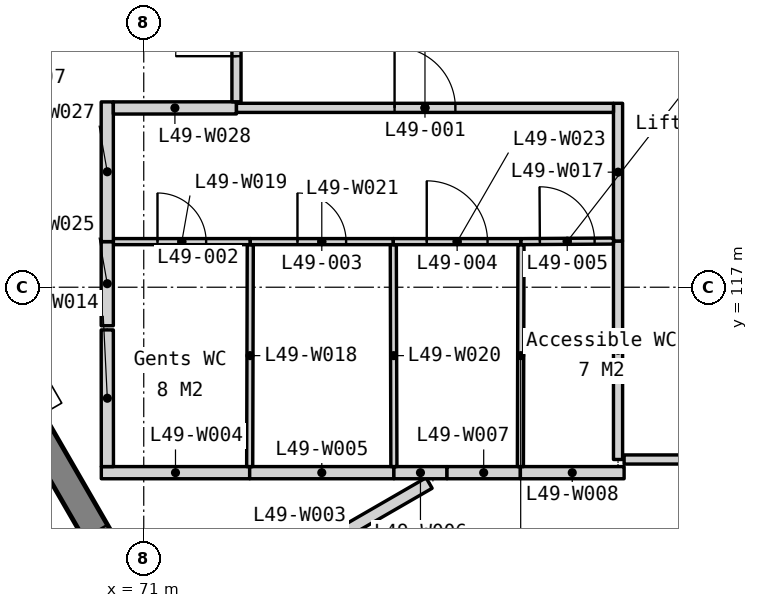
"""IFC4 building model, lengths in metres.
Left out: names, types, materials, properties, quantities, classifications, styles, units other than length and angle.
Written with IfcOpenShell. Run it as: python <this file> out.ifc"""

import sys

from ifc_helpers import new_model, si_unit, direction, frame, frame_2d, origin, place, context, subcontext, project, spatial, polyline, rectangle, outline, extrude, element, fill, save


model = new_model("IFC4")
c1 = context("Model", 3, precision=1e-05, world=origin(), true_north=direction((0.0, 1.0)))
c2 = subcontext(c1, "Body", "Model", "MODEL_VIEW")
j1 = project(units=[si_unit("LENGTHUNIT", "METRE"), si_unit("PLANEANGLEUNIT", "RADIAN")], contexts=[c1])
p1 = place(None, origin())
s1 = spatial("IfcSite", under=j1, at=p1, CompositionType="ELEMENT")
p2 = place(p1, origin())
s2 = spatial("IfcBuilding", under=s1, at=p2, CompositionType="ELEMENT")
p3 = place(p2, frame((0.0, 0.0, 195.8)))
s3 = spatial("IfcBuildingStorey", under=s2, at=p3, CompositionType="ELEMENT", Elevation=195.8)
p4 = place(p3, frame((59.13, 132.168, -0.15), z_axis=(0.0, 0.0, 1.0), x_axis=(0.500002199942, -0.866024133644, 0.0)))
e1 = element("IfcWall", 1, at=p4, inside=s3, PredefinedType="SOLIDWALL", context=c2, shape_type="SweptSolid", body=[
    extrude(outline(polyline([(38.729, 0.0), (38.729, 3.9), (0.0, 3.9), (0.0, 0.0), (38.729, 0.0)])), frame((0.0, 0.225, 0.0), z_axis=(0.0, -1.0, 0.0), x_axis=(1.0, 0.0, 0.0)), (0.0, 0.0, 1.0), 0.45),
])
p5 = place(p4, frame((2.791, 0.0, 0.95)))
e2 = element("IfcOpeningElement", 2, at=p5, cuts=e1, PredefinedType="OPENING", context=c2, shape_type="SweptSolid", body=[
    extrude(rectangle(XDim=1.8, YDim=2.2, at=frame_2d((0.9, 1.1))), frame((0.0, 0.235, 0.0), z_axis=(0.0, -1.0, 0.0), x_axis=(1.0, 0.0, 0.0)), (0.0, 0.0, 1.0), 0.47),
])
p6 = place(p4, frame((5.091, 0.0, 0.95)))
e3 = element("IfcOpeningElement", 3, at=p6, cuts=e1, PredefinedType="OPENING", context=c2, shape_type="SweptSolid", body=[
    extrude(rectangle(XDim=1.8, YDim=2.2, at=frame_2d((0.9, 1.1))), frame((0.0, 0.235, 0.0), z_axis=(0.0, -1.0, 0.0), x_axis=(1.0, 0.0, 0.0)), (0.0, 0.0, 1.0), 0.47),
])
p7 = place(p4, frame((12.473, 0.0, 0.95)))
e4 = element("IfcOpeningElement", 4, at=p7, cuts=e1, PredefinedType="OPENING", context=c2, shape_type="SweptSolid", body=[
    extrude(rectangle(XDim=1.8, YDim=2.2, at=frame_2d((0.9, 1.1))), frame((0.0, 0.235, 0.0), z_axis=(0.0, -1.0, 0.0), x_axis=(1.0, 0.0, 0.0)), (0.0, 0.0, 1.0), 0.47),
])
p8 = place(p4, frame((14.773, 0.0, 0.95)))
e5 = element("IfcOpeningElement", 5, at=p8, cuts=e1, PredefinedType="OPENING", context=c2, shape_type="SweptSolid", body=[
    extrude(rectangle(XDim=1.8, YDim=2.2, at=frame_2d((0.9, 1.1))), frame((0.0, 0.235, 0.0), z_axis=(0.0, -1.0, 0.0), x_axis=(1.0, 0.0, 0.0)), (0.0, 0.0, 1.0), 0.47),
])
p9 = place(p4, frame((22.156, 0.0, 0.95)))
e6 = element("IfcOpeningElement", 6, at=p9, cuts=e1, PredefinedType="OPENING", context=c2, shape_type="SweptSolid", body=[
    extrude(rectangle(XDim=1.8, YDim=2.2, at=frame_2d((0.9, 1.1))), frame((0.0, 0.235, 0.0), z_axis=(0.0, -1.0, 0.0), x_axis=(1.0, 0.0, 0.0)), (0.0, 0.0, 1.0), 0.47),
])
p10 = place(p4, frame((24.456, 0.0, 0.95)))
e7 = element("IfcOpeningElement", 7, at=p10, cuts=e1, PredefinedType="OPENING", context=c2, shape_type="SweptSolid", body=[
    extrude(rectangle(XDim=1.8, YDim=2.2, at=frame_2d((0.9, 1.1))), frame((0.0, 0.235, 0.0), z_axis=(0.0, -1.0, 0.0), x_axis=(1.0, 0.0, 0.0)), (0.0, 0.0, 1.0), 0.47),
])
p11 = place(p4, frame((31.838, 0.0, 0.95)))
e8 = element("IfcOpeningElement", 8, at=p11, cuts=e1, PredefinedType="OPENING", context=c2, shape_type="SweptSolid", body=[
    extrude(rectangle(XDim=1.8, YDim=2.2, at=frame_2d((0.9, 1.1))), frame((0.0, 0.235, 0.0), z_axis=(0.0, -1.0, 0.0), x_axis=(1.0, 0.0, 0.0)), (0.0, 0.0, 1.0), 0.47),
])
p12 = place(p4, frame((34.138, 0.0, 0.95)))
e9 = element("IfcOpeningElement", 9, at=p12, cuts=e1, PredefinedType="OPENING", context=c2, shape_type="SweptSolid", body=[
    extrude(rectangle(XDim=1.8, YDim=2.2, at=frame_2d((0.9, 1.1))), frame((0.0, 0.235, 0.0), z_axis=(0.0, -1.0, 0.0), x_axis=(1.0, 0.0, 0.0)), (0.0, 0.0, 1.0), 0.47),
])
p13 = place(p3, frame((71.428, 111.318, 0.0), z_axis=(0.0, 0.0, 1.0), x_axis=(0.86601964755, 0.500009969958, 0.0)))
e10 = element("IfcWall", 10, at=p13, inside=s3, PredefinedType="PARTITIONING", context=c2, shape_type="SweptSolid", body=[
    extrude(rectangle(XDim=4.925, YDim=0.2, at=frame_2d((2.462, 0.0))), origin(), (0.0, 0.0, 1.0), 3.75),
])
p14 = place(p3, frame((70.302, 113.95, 0.0), z_axis=(0.0, 0.0, 1.0), x_axis=(1.0, 0.0, 0.0)))
e11 = element("IfcWall", 11, at=p14, inside=s3, PredefinedType="PARTITIONING", context=c2, shape_type="SweptSolid", body=[
    extrude(rectangle(XDim=2.44, YDim=0.2, at=frame_2d((1.22, 0.0))), origin(), (0.0, 0.0, 1.0), 3.75),
])
p15 = place(p3, frame((72.742, 113.95, 0.0), z_axis=(0.0, 0.0, 1.0), x_axis=(1.0, 0.0, 0.0)))
e12 = element("IfcWall", 12, at=p15, inside=s3, PredefinedType="PARTITIONING", context=c2, shape_type="SweptSolid", body=[
    extrude(rectangle(XDim=2.372, YDim=0.2, at=frame_2d((1.186, 0.0))), origin(), (0.0, 0.0, 1.0), 3.75),
])
p16 = place(p3, frame((75.114, 113.95, 0.0), z_axis=(0.0, 0.0, 1.0), x_axis=(1.0, 0.0, 0.0)))
e13 = element("IfcWall", 13, at=p16, inside=s3, PredefinedType="PARTITIONING", context=c2, shape_type="SweptSolid", body=[
    extrude(rectangle(XDim=0.873, YDim=0.2, at=frame_2d((0.437, 0.0))), origin(), (0.0, 0.0, 1.0), 3.75),
])
p17 = place(p3, frame((75.987, 113.95, 0.0), z_axis=(0.0, 0.0, 1.0), x_axis=(1.0, 0.0, 0.0)))
e14 = element("IfcWall", 14, at=p17, inside=s3, PredefinedType="PARTITIONING", context=c2, shape_type="SweptSolid", body=[
    extrude(rectangle(XDim=1.207, YDim=0.2, at=frame_2d((0.604, 0.0))), origin(), (0.0, 0.0, 1.0), 3.75),
])
p18 = place(p3, frame((77.194, 113.95, 0.0), z_axis=(0.0, 0.0, 1.0), x_axis=(1.0, 0.0, 0.0)))
e15 = element("IfcWall", 15, at=p18, inside=s3, PredefinedType="PARTITIONING", context=c2, shape_type="SweptSolid", body=[
    extrude(rectangle(XDim=1.706, YDim=0.2, at=frame_2d((0.853, 0.0))), origin(), (0.0, 0.0, 1.0), 3.75),
])
p19 = place(p3, frame((78.9, 114.167, 0.0), z_axis=(0.0, 0.0, 1.0), x_axis=(1.0, 0.0, 0.0)))
e16 = element("IfcWall", 16, at=p19, inside=s3, PredefinedType="PARTITIONING", context=c2, shape_type="SweptSolid", body=[
    extrude(rectangle(XDim=4.737, YDim=0.15, at=frame_2d((2.369, 0.0))), origin(), (0.0, 0.0, 1.0), 3.75),
])
p20 = place(p19, frame((1.469, 0.0, 0.0)))
e17 = element("IfcOpeningElement", 17, at=p20, cuts=e16, PredefinedType="OPENING", context=c2, shape_type="SweptSolid", body=[
    extrude(rectangle(XDim=1.8, YDim=2.1, at=frame_2d((0.9, 1.05))), frame((0.0, 0.085, 0.0), z_axis=(0.0, -1.0, 0.0), x_axis=(1.0, 0.0, 0.0)), (0.0, 0.0, 1.0), 0.17),
])
p21 = place(p3, frame((78.8, 114.167, 0.0), z_axis=(0.0, 0.0, 1.0), x_axis=(0.0, 1.0, 0.0)))
e18 = element("IfcWall", 18, at=p21, inside=s3, PredefinedType="PARTITIONING", context=c2, shape_type="SweptSolid", body=[
    extrude(rectangle(XDim=3.593, YDim=0.15, at=frame_2d((1.797, 0.0))), origin(), (0.0, 0.0, 1.0), 3.75),
])
p22 = place(p3, frame((70.402, 114.05, 0.0), z_axis=(0.0, 0.0, 1.0), x_axis=(-0.000868809403, 0.999999622585, 0.0)))
e19 = element("IfcWall", 19, at=p22, inside=s3, PredefinedType="PARTITIONING", context=c2, shape_type="SweptSolid", body=[
    extrude(rectangle(XDim=2.248, YDim=0.2, at=frame_2d((1.124, 0.0))), origin(), (0.0, 0.0, 1.0), 3.75),
])
p23 = place(p3, frame((78.8, 117.76, 0.0), z_axis=(0.0, 0.0, 1.0), x_axis=(0.0, 1.0, 0.0)))
e20 = element("IfcWall", 20, at=p23, inside=s3, PredefinedType="PARTITIONING", context=c2, shape_type="SweptSolid", body=[
    extrude(rectangle(XDim=2.265, YDim=0.15, at=frame_2d((1.132, 0.0))), origin(), (0.0, 0.0, 1.0), 3.75),
])
p24 = place(p3, frame((72.742, 114.05, 0.0), z_axis=(0.0, 0.0, 1.0), x_axis=(0.002675575707, 0.999996420641, 0.0)))
e21 = element("IfcWall", 21, at=p24, inside=s3, PredefinedType="PARTITIONING", context=c2, shape_type="SweptSolid", body=[
    extrude(rectangle(XDim=3.65, YDim=0.1, at=frame_2d((1.825, 0.0))), origin(), (0.0, 0.0, 1.0), 3.75),
])
p25 = place(p3, frame((70.5, 117.75, 0.0), z_axis=(0.0, 0.0, 1.0), x_axis=(1.0, 0.0, 0.0)))
e22 = element("IfcWall", 22, at=p25, inside=s3, PredefinedType="PARTITIONING", context=c2, shape_type="SweptSolid", body=[
    extrude(rectangle(XDim=2.252, YDim=0.1, at=frame_2d((1.126, 0.0))), origin(), (0.0, 0.0, 1.0), 3.75),
])
p26 = place(p25, frame((0.726, 0.0, 0.0)))
e23 = element("IfcOpeningElement", 23, at=p26, cuts=e22, PredefinedType="OPENING", context=c2, shape_type="SweptSolid", body=[
    extrude(rectangle(XDim=0.8, YDim=2.1, at=frame_2d((0.4, 1.05))), frame((0.0, 0.06, 0.0), z_axis=(0.0, -1.0, 0.0), x_axis=(1.0, 0.0, 0.0)), (0.0, 0.0, 1.0), 0.12),
])
p27 = place(p3, frame((75.114, 114.05, 0.0), z_axis=(0.0, 0.0, 1.0), x_axis=(-0.002608686776, 0.999996597371, 0.0)))
e24 = element("IfcWall", 24, at=p27, inside=s3, PredefinedType="PARTITIONING", context=c2, shape_type="SweptSolid", body=[
    extrude(rectangle(XDim=3.65, YDim=0.1, at=frame_2d((1.825, 0.0))), origin(), (0.0, 0.0, 1.0), 3.75),
])
p28 = place(p3, frame((72.752, 117.75, 0.0), z_axis=(0.0, 0.0, 1.0), x_axis=(1.0, 0.0, 0.0)))
e25 = element("IfcWall", 25, at=p28, inside=s3, PredefinedType="PARTITIONING", context=c2, shape_type="SweptSolid", body=[
    extrude(rectangle(XDim=2.352, YDim=0.1, at=frame_2d((1.176, 0.0))), origin(), (0.0, 0.0, 1.0), 3.75),
])
p29 = place(p28, frame((0.776, 0.0, 0.0)))
e26 = element("IfcOpeningElement", 26, at=p29, cuts=e25, PredefinedType="OPENING", context=c2, shape_type="SweptSolid", body=[
    extrude(rectangle(XDim=0.8, YDim=2.1, at=frame_2d((0.4, 1.05))), frame((0.0, 0.06, 0.0), z_axis=(0.0, -1.0, 0.0), x_axis=(1.0, 0.0, 0.0)), (0.0, 0.0, 1.0), 0.12),
])
p30 = place(p3, frame((77.194, 114.05, 0.0), z_axis=(0.0, 0.0, 1.0), x_axis=(0.002608686776, 0.999996597371, 0.0)))
e27 = element("IfcWall", 27, at=p30, inside=s3, PredefinedType="PARTITIONING", context=c2, shape_type="SweptSolid", body=[
    extrude(rectangle(XDim=3.65, YDim=0.1, at=frame_2d((1.825, 0.0))), origin(), (0.0, 0.0, 1.0), 3.75),
])
p31 = place(p3, frame((75.104, 117.75, 0.0), z_axis=(0.0, 0.0, 1.0), x_axis=(1.0, 0.0, 0.0)))
e28 = element("IfcWall", 28, at=p31, inside=s3, PredefinedType="PARTITIONING", context=c2, shape_type="SweptSolid", body=[
    extrude(rectangle(XDim=2.1, YDim=0.1, at=frame_2d((1.05, 0.0))), origin(), (0.0, 0.0, 1.0), 3.75),
])
p32 = place(p31, frame((0.55, 0.0, 0.0)))
e29 = element("IfcOpeningElement", 29, at=p32, cuts=e28, PredefinedType="OPENING", context=c2, shape_type="SweptSolid", body=[
    extrude(rectangle(XDim=1.0, YDim=2.1, at=frame_2d((0.5, 1.05))), frame((0.0, 0.06, 0.0), z_axis=(0.0, -1.0, 0.0), x_axis=(1.0, 0.0, 0.0)), (0.0, 0.0, 1.0), 0.12),
])
p33 = place(p3, frame((77.204, 117.75, 0.0), z_axis=(0.0, 0.0, 1.0), x_axis=(0.999980406575, 0.006259909447, 0.0)))
e30 = element("IfcWall", 30, at=p33, inside=s3, PredefinedType="PARTITIONING", context=c2, shape_type="SweptSolid", body=[
    extrude(rectangle(XDim=1.521, YDim=0.1, at=frame_2d((0.76, 0.0))), origin(), (0.0, 0.0, 1.0), 3.75),
])
p34 = place(p33, frame((0.311, 0.0, 0.0)))
e31 = element("IfcOpeningElement", 31, at=p34, cuts=e30, PredefinedType="OPENING", context=c2, shape_type="SweptSolid", body=[
    extrude(rectangle(XDim=0.9, YDim=2.1, at=frame_2d((0.45, 1.05))), frame((0.0, 0.06, 0.0), z_axis=(0.0, -1.0, 0.0), x_axis=(1.0, 0.0, 0.0)), (0.0, 0.0, 1.0), 0.12),
])
p35 = place(p3, frame((70.4, 116.367, 0.0), z_axis=(0.0, 0.0, 1.0), x_axis=(0.0, 1.0, 0.0)))
e32 = element("IfcWall", 32, at=p35, inside=s3, PredefinedType="PARTITIONING", context=c2, shape_type="SweptSolid", body=[
    extrude(rectangle(XDim=1.383, YDim=0.2, at=frame_2d((0.692, 0.0))), origin(), (0.0, 0.0, 1.0), 3.75),
])
p36 = place(p3, frame((66.587, 119.703, 0.0), z_axis=(0.0, 0.0, 1.0), x_axis=(0.866023511746, 0.500003277092, 0.0)))
e33 = element("IfcWall", 33, at=p36, inside=s3, PredefinedType="PARTITIONING", context=c2, shape_type="SweptSolid", body=[
    extrude(rectangle(XDim=5.694, YDim=0.1, at=frame_2d((2.847, 0.0))), origin(), (0.0, 0.0, 1.0), 3.75),
])
p37 = place(p36, frame((2.397, 0.0, 0.0)))
e34 = element("IfcOpeningElement", 34, at=p37, cuts=e33, PredefinedType="OPENING", context=c2, shape_type="SweptSolid", body=[
    extrude(rectangle(XDim=0.9, YDim=2.1, at=frame_2d((0.45, 1.05))), frame((0.0, 0.06, 0.0), z_axis=(0.0, -1.0, 0.0), x_axis=(1.0, 0.0, 0.0)), (0.0, 0.0, 1.0), 0.12),
])
p38 = place(p3, frame((70.4, 117.75, 0.0), z_axis=(0.0, 0.0, 1.0), x_axis=(0.0, 1.0, 0.0)))
e35 = element("IfcWall", 35, at=p38, inside=s3, PredefinedType="PARTITIONING", context=c2, shape_type="SweptSolid", body=[
    extrude(rectangle(XDim=2.298, YDim=0.2, at=frame_2d((1.149, 0.0))), origin(), (0.0, 0.0, 1.0), 3.75),
])
p39 = place(p3, frame((70.5, 119.948, 0.0), z_axis=(0.0, 0.0, 1.0), x_axis=(0.999999534819, 0.00096455224, 0.0)))
e36 = element("IfcWall", 36, at=p39, inside=s3, PredefinedType="PARTITIONING", context=c2, shape_type="SweptSolid", body=[
    extrude(rectangle(XDim=2.025, YDim=0.2, at=frame_2d((1.012, 0.0))), origin(), (0.0, 0.0, 1.0), 3.75),
])
p40 = place(p3, frame((72.525, 120.05, 0.0), z_axis=(0.0, 0.0, 1.0), x_axis=(0.0, 1.0, 0.0)))
e37 = element("IfcWall", 37, at=p40, inside=s3, PredefinedType="PARTITIONING", context=c2, shape_type="SweptSolid", body=[
    extrude(rectangle(XDim=2.5, YDim=0.15, at=frame_2d((1.25, 0.0))), origin(), (0.0, 0.0, 1.0), 3.75),
])
p41 = place(p40, frame((0.75, 0.0, 0.0)))
e38 = element("IfcOpeningElement", 38, at=p41, cuts=e37, PredefinedType="OPENING", context=c2, shape_type="SweptSolid", body=[
    extrude(rectangle(XDim=1.0, YDim=2.1, at=frame_2d((0.5, 1.05))), frame((0.0, 0.085, 0.0), z_axis=(0.0, -1.0, 0.0), x_axis=(1.0, 0.0, 0.0)), (0.0, 0.0, 1.0), 0.17),
])
p42 = place(p3, frame((72.525, 119.95, 0.0), z_axis=(0.0, 0.0, 1.0), x_axis=(1.0, 0.0, 0.0)))
e39 = element("IfcWall", 39, at=p42, inside=s3, PredefinedType="PARTITIONING", context=c2, shape_type="SweptSolid", body=[
    extrude(rectangle(XDim=6.2, YDim=0.15, at=frame_2d((3.1, 0.0))), origin(), (0.0, 0.0, 1.0), 3.75),
])
p43 = place(p42, frame((2.6, 0.0, 0.0)))
e40 = element("IfcOpeningElement", 40, at=p43, cuts=e39, PredefinedType="OPENING", context=c2, shape_type="SweptSolid", body=[
    extrude(rectangle(XDim=1.0, YDim=2.1, at=frame_2d((0.5, 1.05))), frame((0.0, 0.085, 0.0), z_axis=(0.0, -1.0, 0.0), x_axis=(1.0, 0.0, 0.0)), (0.0, 0.0, 1.0), 0.17),
])
p44 = place(p43, origin())
e41 = element("IfcDoor", 41, at=p44, inside=s3, OperationType="SINGLE_SWING_LEFT", PredefinedType="DOOR", context=c2, shape_type="SweptSolid", body=[
    extrude(rectangle(XDim=1.0, YDim=2.1, at=frame_2d((0.5, 1.05))), frame((0.0, 0.025, 0.0), z_axis=(0.0, -1.0, 0.0), x_axis=(1.0, 0.0, 0.0)), (0.0, 0.0, 1.0), 0.05),
])
fill(e40, e41)
p45 = place(p26, origin())
e42 = element("IfcDoor", 42, at=p45, inside=s3, OperationType="SINGLE_SWING_LEFT", PredefinedType="DOOR", context=c2, shape_type="SweptSolid", body=[
    extrude(rectangle(XDim=0.8, YDim=2.1, at=frame_2d((0.4, 1.05))), frame((0.0, 0.025, 0.0), z_axis=(0.0, -1.0, 0.0), x_axis=(1.0, 0.0, 0.0)), (0.0, 0.0, 1.0), 0.05),
])
fill(e23, e42)
p46 = place(p29, origin())
e43 = element("IfcDoor", 43, at=p46, inside=s3, OperationType="SINGLE_SWING_LEFT", PredefinedType="DOOR", context=c2, shape_type="SweptSolid", body=[
    extrude(rectangle(XDim=0.8, YDim=2.1, at=frame_2d((0.4, 1.05))), frame((0.0, 0.025, 0.0), z_axis=(0.0, -1.0, 0.0), x_axis=(1.0, 0.0, 0.0)), (0.0, 0.0, 1.0), 0.05),
])
fill(e26, e43)
p47 = place(p32, origin())
e44 = element("IfcDoor", 44, at=p47, inside=s3, OperationType="SINGLE_SWING_LEFT", PredefinedType="DOOR", context=c2, shape_type="SweptSolid", body=[
    extrude(rectangle(XDim=1.0, YDim=2.1, at=frame_2d((0.5, 1.05))), frame((0.0, 0.025, 0.0), z_axis=(0.0, -1.0, 0.0), x_axis=(1.0, 0.0, 0.0)), (0.0, 0.0, 1.0), 0.05),
])
fill(e29, e44)
p48 = place(p34, origin())
e45 = element("IfcDoor", 45, at=p48, inside=s3, OperationType="SINGLE_SWING_LEFT", PredefinedType="DOOR", context=c2, shape_type="SweptSolid", body=[
    extrude(rectangle(XDim=0.9, YDim=2.1, at=frame_2d((0.45, 1.05))), frame((0.0, 0.025, 0.0), z_axis=(0.0, -1.0, 0.0), x_axis=(1.0, 0.0, 0.0)), (0.0, 0.0, 1.0), 0.05),
])
fill(e31, e45)
p49 = place(p41, origin())
e46 = element("IfcDoor", 46, at=p49, inside=s3, OperationType="SINGLE_SWING_LEFT", PredefinedType="DOOR", context=c2, shape_type="SweptSolid", body=[
    extrude(rectangle(XDim=1.0, YDim=2.1, at=frame_2d((0.5, 1.05))), frame((0.0, 0.025, 0.0), z_axis=(0.0, -1.0, 0.0), x_axis=(1.0, 0.0, 0.0)), (0.0, 0.0, 1.0), 0.05),
])
fill(e38, e46)
save(model, sys.argv[1])
